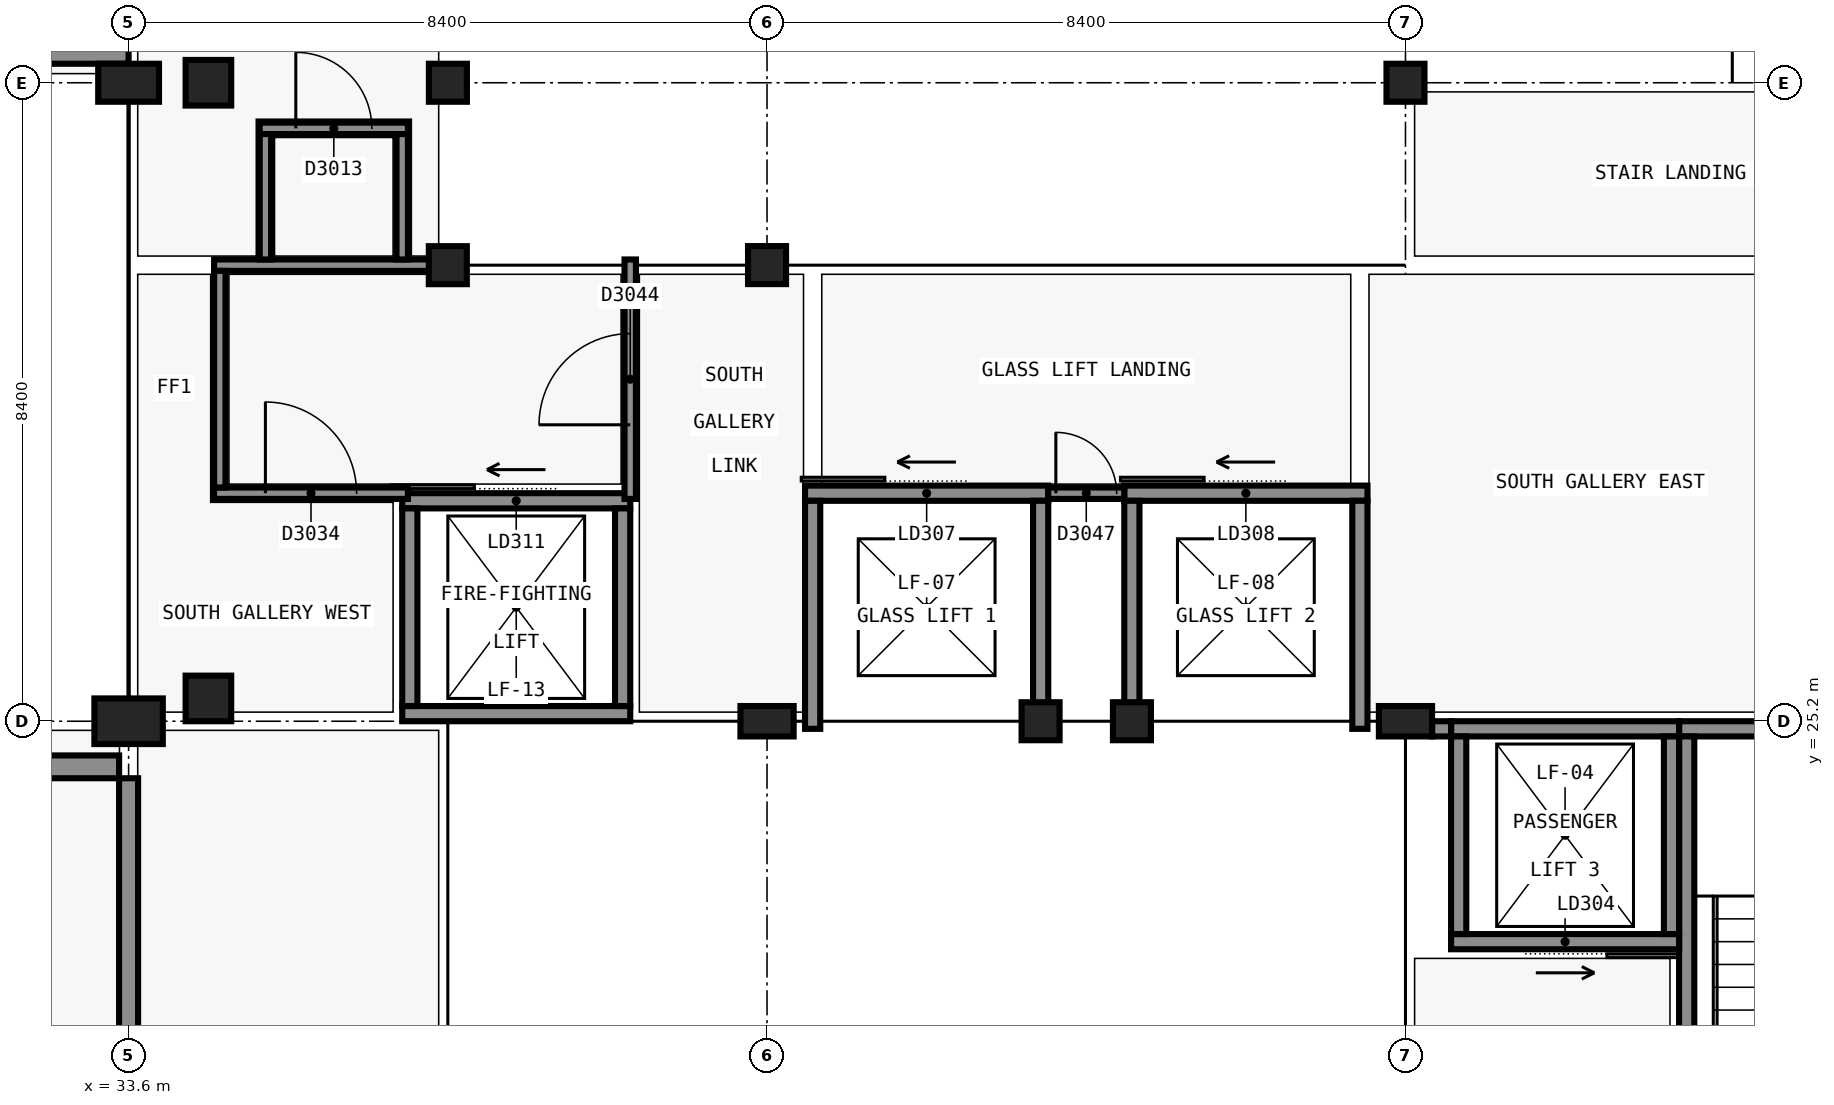
"""IFC4 building model, lengths in metres.
Left out: names, types, materials, properties, quantities, classifications, styles, units other than length and angle.
Written with IfcOpenShell. Run it as: python <this file> out.ifc"""

import sys

from ifc_helpers import new_model, si_unit, direction, frame, frame_2d, origin, origin_2d, place, context, subcontext, project, spatial, rectangle, extrude, element, fill, save


model = new_model("IFC4")
c1 = context("Model", 3, precision=1e-05, world=origin(), true_north=direction((0.0, 1.0)))
c2 = subcontext(c1, "Body", "Model", "MODEL_VIEW")
j1 = project(units=[si_unit("LENGTHUNIT", "METRE"), si_unit("PLANEANGLEUNIT", "RADIAN")], contexts=[c1])
p1 = place(None, origin())
s1 = spatial("IfcSite", under=j1, at=p1, CompositionType="ELEMENT")
p2 = place(p1, origin())
s2 = spatial("IfcBuilding", under=s1, at=p2, CompositionType="ELEMENT")
p3 = place(p2, frame((0.0, 0.0, 15.0)))
s3 = spatial("IfcBuildingStorey", under=s2, at=p3, CompositionType="ELEMENT", Elevation=15.0)
p4 = place(p3, frame((54.0, 25.1, 0.0), z_axis=(0.0, 0.0, 1.0), x_axis=(1.0, 0.0, 0.0)))
e1 = element("IfcWall", 1, at=p4, inside=s3, PredefinedType="SHEAR", context=c2, shape_type="SweptSolid", body=[
    extrude(rectangle(XDim=4.8, YDim=0.2, at=frame_2d((2.4, 0.0))), origin(), (0.0, 0.0, 1.0), 4.8),
])
p5 = place(p3, frame((54.1, 15.8, 0.0), z_axis=(0.0, 0.0, 1.0), x_axis=(0.0, 1.0, 0.0)))
e2 = element("IfcWall", 2, at=p5, inside=s3, PredefinedType="SHEAR", context=c2, shape_type="SweptSolid", body=[
    extrude(rectangle(XDim=9.2, YDim=0.2, at=frame_2d((4.6, 0.0))), origin(), (0.0, 0.0, 1.0), 4.8),
])
p6 = place(p5, frame((0.5, 0.0, 0.0)))
e3 = element("IfcOpeningElement", 3, at=p6, cuts=e2, PredefinedType="OPENING", context=c2, shape_type="SweptSolid", body=[
    extrude(rectangle(XDim=1.2, YDim=2.1, at=frame_2d((0.6, 1.05))), frame((0.0, 0.11, 0.0), z_axis=(0.0, -1.0, 0.0), x_axis=(1.0, 0.0, 0.0)), (0.0, 0.0, 1.0), 0.22),
])
p7 = place(p3, frame((54.0, 22.3, 0.0), z_axis=(0.0, 0.0, 1.0), x_axis=(-1.0, 0.0, 0.0)))
e4 = element("IfcWall", 4, at=p7, inside=s3, PredefinedType="SHEAR", context=c2, shape_type="SweptSolid", body=[
    extrude(rectangle(XDim=3.0, YDim=0.2, at=frame_2d((1.5, 0.0))), origin(), (0.0, 0.0, 1.0), 4.8),
])
p8 = place(p7, frame((0.95, 0.0, 0.0)))
e5 = element("IfcOpeningElement", 5, at=p8, cuts=e4, PredefinedType="OPENING", context=c2, shape_type="SweptSolid", body=[
    extrude(rectangle(XDim=1.1, YDim=2.1, at=frame_2d((0.55, 1.05))), frame((0.0, 0.11, 0.0), z_axis=(0.0, -1.0, 0.0), x_axis=(1.0, 0.0, 0.0)), (0.0, 0.0, 1.0), 0.22),
])
p9 = place(p3, frame((51.0, 25.1, 0.0), z_axis=(0.0, 0.0, 1.0), x_axis=(1.0, 0.0, 0.0)))
e6 = element("IfcWall", 6, at=p9, inside=s3, PredefinedType="SHEAR", context=c2, shape_type="SweptSolid", body=[
    extrude(rectangle(XDim=3.0, YDim=0.2, at=frame_2d((1.5, 0.0))), origin(), (0.0, 0.0, 1.0), 4.8),
])
for number, where, z_axis, x_axis in (
    (7, (51.1, 22.4, 0.0), (0.0, 0.0, 1.0), (0.0, 1.0, 0.0)),
    (8, (53.9, 25.0, 0.0), (0.0, 0.0, 1.0), (0.0, -1.0, 0.0)),
):
    element("IfcWall", number, at=place(p3, frame(where, z_axis=z_axis, x_axis=x_axis)), inside=s3, PredefinedType="SHEAR", context=c2, shape_type="SweptSolid", body=[
        extrude(rectangle(XDim=2.6, YDim=0.2, at=frame_2d((1.3, 0.0))), origin(), (0.0, 0.0, 1.0), 4.8),
    ])
p10 = place(p3, frame((40.2, 25.3, 0.0), z_axis=(0.0, 0.0, 1.0), x_axis=(-1.0, 0.0, 0.0)))
e9 = element("IfcWall", 9, at=p10, inside=s3, PredefinedType="SHEAR", context=c2, shape_type="SweptSolid", body=[
    extrude(rectangle(XDim=3.0, YDim=0.2, at=frame_2d((1.5, 0.0))), origin(), (0.0, 0.0, 1.0), 4.8),
])
p11 = place(p3, frame((37.2, 28.1, 0.0), z_axis=(0.0, 0.0, 1.0), x_axis=(1.0, 0.0, 0.0)))
e10 = element("IfcWall", 10, at=p11, inside=s3, PredefinedType="SHEAR", context=c2, shape_type="SweptSolid", body=[
    extrude(rectangle(XDim=3.0, YDim=0.2, at=frame_2d((1.5, 0.0))), origin(), (0.0, 0.0, 1.0), 4.8),
])
p12 = place(p11, frame((0.95, 0.0, 0.0)))
e11 = element("IfcOpeningElement", 11, at=p12, cuts=e10, PredefinedType="OPENING", context=c2, shape_type="SweptSolid", body=[
    extrude(rectangle(XDim=1.1, YDim=2.1, at=frame_2d((0.55, 1.05))), frame((0.0, 0.11, 0.0), z_axis=(0.0, -1.0, 0.0), x_axis=(1.0, 0.0, 0.0)), (0.0, 0.0, 1.0), 0.22),
])
for number, where, z_axis, x_axis in (
    (12, (37.3, 25.4, 0.0), (0.0, 0.0, 1.0), (0.0, 1.0, 0.0)),
    (13, (40.1, 28.0, 0.0), (0.0, 0.0, 1.0), (0.0, -1.0, 0.0)),
):
    element("IfcWall", number, at=place(p3, frame(where, z_axis=z_axis, x_axis=x_axis)), inside=s3, PredefinedType="SHEAR", context=c2, shape_type="SweptSolid", body=[
        extrude(rectangle(XDim=2.6, YDim=0.2, at=frame_2d((1.3, 0.0))), origin(), (0.0, 0.0, 1.0), 4.8),
    ])
p13 = place(p3, frame((33.6, 25.2, 0.0), z_axis=(0.0, 0.0, 1.0), x_axis=(1.0, 0.0, 0.0)))
e14 = element("IfcColumn", 14, at=p13, inside=s3, PredefinedType="COLUMN", context=c2, shape_type="SweptSolid", body=[
    extrude(rectangle(XDim=0.9, YDim=0.6, at=origin_2d()), origin(), (0.0, 0.0, 1.0), 4.8),
])
p14 = place(p3, frame((50.4, 25.2, 0.0), z_axis=(0.0, 0.0, 1.0), x_axis=(1.0, 0.0, 0.0)))
e15 = element("IfcColumn", 15, at=p14, inside=s3, PredefinedType="COLUMN", context=c2, shape_type="SweptSolid", body=[
    extrude(rectangle(XDim=0.7, YDim=0.4, at=origin_2d()), origin(), (0.0, 0.0, 1.0), 4.8),
])
p15 = place(p3, frame((33.6, 33.6, 0.0), z_axis=(0.0, 0.0, 1.0), x_axis=(1.0, 0.0, 0.0)))
e16 = element("IfcColumn", 16, at=p15, inside=s3, PredefinedType="COLUMN", context=c2, shape_type="SweptSolid", body=[
    extrude(rectangle(XDim=0.8, YDim=0.5, at=origin_2d()), origin(), (0.0, 0.0, 1.0), 4.8),
])
p16 = place(p3, frame((42.0, 25.2, 0.0), z_axis=(0.0, 0.0, 1.0), x_axis=(1.0, 0.0, 0.0)))
e17 = element("IfcColumn", 17, at=p16, inside=s3, PredefinedType="COLUMN", context=c2, shape_type="SweptSolid", body=[
    extrude(rectangle(XDim=0.7, YDim=0.4, at=origin_2d()), origin(), (0.0, 0.0, 1.0), 4.8),
])
p17 = place(p3, frame((50.4, 33.6, 0.0), z_axis=(0.0, 0.0, 1.0), x_axis=(1.0, 0.0, 0.0)))
e18 = element("IfcColumn", 18, at=p17, inside=s3, PredefinedType="COLUMN", context=c2, shape_type="SweptSolid", body=[
    extrude(rectangle(XDim=0.5, YDim=0.5, at=origin_2d()), origin(), (0.0, 0.0, 1.0), 4.8),
])
for number, where, z_axis, x_axis in (
    (19, (34.65, 25.5, 0.0), (0.0, 0.0, 1.0), (1.0, 0.0, 0.0)),
    (20, (34.65, 33.6, 0.0), (0.0, 0.0, 1.0), (1.0, 0.0, 0.0)),
):
    element("IfcColumn", number, at=place(p3, frame(where, z_axis=z_axis, x_axis=x_axis)), inside=s3, PredefinedType="COLUMN", context=c2, shape_type="SweptSolid", body=[
        extrude(rectangle(XDim=0.6, YDim=0.6, at=origin_2d()), origin(), (0.0, 0.0, 1.0), 4.8),
    ])
p18 = place(p3, frame((50.75, 25.1, 0.0), z_axis=(0.0, 0.0, 1.0), x_axis=(1.0, 0.0, 0.0)))
e21 = element("IfcWall", 21, at=p18, inside=s3, PredefinedType="SHEAR", context=c2, shape_type="SweptSolid", body=[
    extrude(rectangle(XDim=0.25, YDim=0.2, at=frame_2d((0.125, 0.0))), origin(), (0.0, 0.0, 1.0), 4.8),
])
for number, where, z_axis, x_axis in (
    (22, (45.599, 25.2, 0.0), (0.0, 0.0, 1.0), (1.0, 0.0, 0.0)),
    (23, (46.801, 25.2, 0.0), (0.0, 0.0, 1.0), (1.0, 0.0, 0.0)),
    (24, (37.8, 31.2, 0.0), (0.0, 0.0, 1.0), (1.0, 0.0, 0.0)),
    (25, (37.801, 33.6, 0.0), (0.0, 0.0, 1.0), (1.0, 0.0, 0.0)),
    (26, (42.0, 31.201, 0.0), (0.0, 0.0, 1.0), (1.0, 0.0, 0.0)),
):
    element("IfcColumn", number, at=place(p3, frame(where, z_axis=z_axis, x_axis=x_axis)), inside=s3, PredefinedType="COLUMN", context=c2, shape_type="SweptSolid", body=[
        extrude(rectangle(XDim=0.5, YDim=0.5, at=origin_2d()), origin(), (0.0, 0.0, 1.0), 4.8),
    ])
p19 = place(p3, frame((29.051, 24.6, 0.0), z_axis=(0.0, 0.0, 1.0), x_axis=(1.0, 0.0, 0.0)))
e27 = element("IfcWall", 27, at=p19, inside=s3, PredefinedType="SOLIDWALL", context=c2, shape_type="SweptSolid", body=[
    extrude(rectangle(XDim=4.425, YDim=0.3, at=frame_2d((2.212, 0.0))), origin(), (0.0, 0.0, 1.0), 4.5),
])
p20 = place(p19, frame((0.775, 0.0, 0.9)))
e28 = element("IfcOpeningElement", 28, at=p20, cuts=e27, PredefinedType="OPENING", context=c2, shape_type="SweptSolid", body=[
    extrude(rectangle(XDim=2.4, YDim=1.5, at=frame_2d((1.2, 0.75))), frame((0.0, 0.16, 0.0), z_axis=(0.0, -1.0, 0.0), x_axis=(1.0, 0.0, 0.0)), (0.0, 0.0, 1.0), 0.32),
])
p21 = place(p3, frame((33.6, 34.0, 0.0), z_axis=(0.0, 0.0, 1.0), x_axis=(-1.0, 0.0, 0.0)))
e29 = element("IfcWall", 29, at=p21, inside=s3, PredefinedType="SOLIDWALL", context=c2, shape_type="SweptSolid", body=[
    extrude(rectangle(XDim=4.557, YDim=0.3, at=frame_2d((2.278, 0.0))), origin(), (0.0, 0.0, 1.0), 4.5),
])
p22 = place(p3, frame((33.6, 8.6, 0.0), z_axis=(0.0, 0.0, 1.0), x_axis=(0.0, 1.0, 0.0)))
e30 = element("IfcWall", 30, at=p22, inside=s3, PredefinedType="SOLIDWALL", context=c2, shape_type="SweptSolid", body=[
    extrude(rectangle(XDim=15.85, YDim=0.25, at=frame_2d((7.925, 0.0))), origin(), (0.0, 0.0, 1.0), 3.8),
])
p23 = place(p3, frame((42.5, 28.2, 0.0), z_axis=(0.0, 0.0, 1.0), x_axis=(1.0, 0.0, 0.0)))
e31 = element("IfcWall", 31, at=p23, inside=s3, PredefinedType="SHEAR", context=c2, shape_type="SweptSolid", body=[
    extrude(rectangle(XDim=3.2, YDim=0.2, at=frame_2d((1.6, 0.0))), origin(), (0.0, 0.0, 1.0), 4.5),
])
p24 = place(p23, frame((1.05, 0.0, 0.0)))
e32 = element("IfcOpeningElement", 32, at=p24, cuts=e31, PredefinedType="OPENING", context=c2, shape_type="SweptSolid", body=[
    extrude(rectangle(XDim=1.1, YDim=2.1, at=frame_2d((0.55, 1.05))), frame((0.0, 0.11, 0.0), z_axis=(0.0, -1.0, 0.0), x_axis=(1.0, 0.0, 0.0)), (0.0, 0.0, 1.0), 0.22),
])
p25 = place(p3, frame((46.7, 28.2, 0.0), z_axis=(0.0, 0.0, 1.0), x_axis=(1.0, 0.0, 0.0)))
e33 = element("IfcWall", 33, at=p25, inside=s3, PredefinedType="SHEAR", context=c2, shape_type="SweptSolid", body=[
    extrude(rectangle(XDim=3.2, YDim=0.2, at=frame_2d((1.6, 0.0))), origin(), (0.0, 0.0, 1.0), 4.5),
])
p26 = place(p25, frame((1.05, 0.0, 0.0)))
e34 = element("IfcOpeningElement", 34, at=p26, cuts=e33, PredefinedType="OPENING", context=c2, shape_type="SweptSolid", body=[
    extrude(rectangle(XDim=1.1, YDim=2.1, at=frame_2d((0.55, 1.05))), frame((0.0, 0.11, 0.0), z_axis=(0.0, -1.0, 0.0), x_axis=(1.0, 0.0, 0.0)), (0.0, 0.0, 1.0), 0.22),
])
for number, where, z_axis, x_axis in (
    (35, (42.6, 25.1, 0.0), (0.0, 0.0, 1.0), (0.0, 1.0, 0.0)),
    (36, (45.6, 25.1, 0.0), (0.0, 0.0, 1.0), (0.0, 1.0, 0.0)),
    (37, (46.8, 25.1, 0.0), (0.0, 0.0, 1.0), (0.0, 1.0, 0.0)),
    (38, (49.8, 25.1, 0.0), (0.0, 0.0, 1.0), (0.0, 1.0, 0.0)),
):
    element("IfcWall", number, at=place(p3, frame(where, z_axis=z_axis, x_axis=x_axis)), inside=s3, PredefinedType="SHEAR", context=c2, shape_type="SweptSolid", body=[
        extrude(rectangle(XDim=3.0, YDim=0.2, at=frame_2d((1.5, 0.0))), origin(), (0.0, 0.0, 1.0), 4.5),
    ])
p27 = place(p3, frame((35.325, 33.0, 0.0), z_axis=(0.0, 0.0, 1.0), x_axis=(1.0, 0.0, 0.0)))
e39 = element("IfcWall", 39, at=p27, inside=s3, PredefinedType="PARTITIONING", context=c2, shape_type="SweptSolid", body=[
    extrude(rectangle(XDim=1.95, YDim=0.15, at=frame_2d((0.975, 0.0))), origin(), (0.0, 0.0, 1.0), 4.5),
])
p28 = place(p27, frame((0.475, 0.0, 0.0)))
e40 = element("IfcOpeningElement", 40, at=p28, cuts=e39, PredefinedType="OPENING", context=c2, shape_type="SweptSolid", body=[
    extrude(rectangle(XDim=1.0, YDim=2.1, at=frame_2d((0.5, 1.05))), frame((0.0, 0.085, 0.0), z_axis=(0.0, -1.0, 0.0), x_axis=(1.0, 0.0, 0.0)), (0.0, 0.0, 1.0), 0.17),
])
p29 = place(p3, frame((34.725, 28.2, 0.0), z_axis=(0.0, 0.0, 1.0), x_axis=(1.0, 0.0, 0.0)))
e41 = element("IfcWall", 41, at=p29, inside=s3, PredefinedType="SOLIDWALL", context=c2, shape_type="SweptSolid", body=[
    extrude(rectangle(XDim=2.55, YDim=0.15, at=frame_2d((1.275, 0.0))), origin(), (0.0, 0.0, 1.0), 4.5),
])
p30 = place(p29, frame((0.675, 0.0, 0.0)))
e42 = element("IfcOpeningElement", 42, at=p30, cuts=e41, PredefinedType="OPENING", context=c2, shape_type="SweptSolid", body=[
    extrude(rectangle(XDim=1.2, YDim=2.1, at=frame_2d((0.6, 1.05))), frame((0.0, 0.085, 0.0), z_axis=(0.0, -1.0, 0.0), x_axis=(1.0, 0.0, 0.0)), (0.0, 0.0, 1.0), 0.17),
])
p31 = place(p3, frame((34.725, 31.2, 0.0), z_axis=(0.0, 0.0, 1.0), x_axis=(1.0, 0.0, 0.0)))
e43 = element("IfcWall", 43, at=p31, inside=s3, PredefinedType="SOLIDWALL", context=c2, shape_type="SweptSolid", body=[
    extrude(rectangle(XDim=3.15, YDim=0.15, at=frame_2d((1.575, 0.0))), origin(), (0.0, 0.0, 1.0), 4.0),
])
p32 = place(p3, frame((45.7, 28.2, 0.0), z_axis=(0.0, 0.0, 1.0), x_axis=(1.0, 0.0, 0.0)))
e44 = element("IfcWall", 44, at=p32, inside=s3, PredefinedType="SOLIDWALL", context=c2, shape_type="SweptSolid", body=[
    extrude(rectangle(XDim=1.0, YDim=0.15, at=frame_2d((0.5, 0.0))), origin(), (0.0, 0.0, 1.0), 4.5),
])
p33 = place(p32, frame((0.1, 0.0, 0.0)))
e45 = element("IfcOpeningElement", 45, at=p33, cuts=e44, PredefinedType="OPENING", context=c2, shape_type="SweptSolid", body=[
    extrude(rectangle(XDim=0.8, YDim=2.1, at=frame_2d((0.4, 1.05))), frame((0.0, 0.085, 0.0), z_axis=(0.0, -1.0, 0.0), x_axis=(1.0, 0.0, 0.0)), (0.0, 0.0, 1.0), 0.17),
])
for number, where, z_axis, x_axis in (
    (46, (35.4, 31.275, 0.0), (0.0, 0.0, 1.0), (0.0, 1.0, 0.0)),
    (47, (37.2, 31.275, 0.0), (0.0, 0.0, 1.0), (0.0, 1.0, 0.0)),
):
    element("IfcWall", number, at=place(p3, frame(where, z_axis=z_axis, x_axis=x_axis)), inside=s3, PredefinedType="PARTITIONING", context=c2, shape_type="SweptSolid", body=[
        extrude(rectangle(XDim=1.65, YDim=0.15, at=frame_2d((0.825, 0.0))), origin(), (0.0, 0.0, 1.0), 4.5),
    ])
p34 = place(p3, frame((34.8, 28.275, 0.0), z_axis=(0.0, 0.0, 1.0), x_axis=(0.0, 1.0, 0.0)))
e48 = element("IfcWall", 48, at=p34, inside=s3, PredefinedType="SOLIDWALL", context=c2, shape_type="SweptSolid", body=[
    extrude(rectangle(XDim=2.85, YDim=0.15, at=frame_2d((1.425, 0.0))), origin(), (0.0, 0.0, 1.0), 4.5),
])
p35 = place(p3, frame((40.2, 28.125, 0.0), z_axis=(0.0, 0.0, 1.0), x_axis=(0.0, 1.0, 0.0)))
e49 = element("IfcWall", 49, at=p35, inside=s3, PredefinedType="SOLIDWALL", context=c2, shape_type="SweptSolid", body=[
    extrude(rectangle(XDim=3.15, YDim=0.15, at=frame_2d((1.575, 0.0))), origin(), (0.0, 0.0, 1.0), 4.0),
])
p36 = place(p35, frame((0.975, 0.0, 0.0)))
e50 = element("IfcOpeningElement", 50, at=p36, cuts=e49, PredefinedType="OPENING", context=c2, shape_type="SweptSolid", body=[
    extrude(rectangle(XDim=1.2, YDim=2.1, at=frame_2d((0.6, 1.05))), frame((0.0, 0.085, 0.0), z_axis=(0.0, -1.0, 0.0), x_axis=(1.0, 0.0, 0.0)), (0.0, 0.0, 1.0), 0.17),
])
p37 = place(p8, origin())
e51 = element("IfcDoor", 51, at=p37, inside=s3, OperationType="SLIDING_TO_LEFT", PredefinedType="DOOR", context=c2, shape_type="SweptSolid", body=[
    extrude(rectangle(XDim=1.1, YDim=2.1, at=frame_2d((0.55, 1.05))), frame((0.0, 0.025, 0.0), z_axis=(0.0, -1.0, 0.0), x_axis=(1.0, 0.0, 0.0)), (0.0, 0.0, 1.0), 0.05),
])
fill(e5, e51)
p38 = place(p24, origin())
e52 = element("IfcDoor", 52, at=p38, inside=s3, OperationType="SLIDING_TO_LEFT", PredefinedType="DOOR", context=c2, shape_type="SweptSolid", body=[
    extrude(rectangle(XDim=1.1, YDim=2.1, at=frame_2d((0.55, 1.05))), frame((0.0, 0.025, 0.0), z_axis=(0.0, -1.0, 0.0), x_axis=(1.0, 0.0, 0.0)), (0.0, 0.0, 1.0), 0.05),
])
fill(e32, e52)
p39 = place(p26, origin())
e53 = element("IfcDoor", 53, at=p39, inside=s3, OperationType="SLIDING_TO_LEFT", PredefinedType="DOOR", context=c2, shape_type="SweptSolid", body=[
    extrude(rectangle(XDim=1.1, YDim=2.1, at=frame_2d((0.55, 1.05))), frame((0.0, 0.025, 0.0), z_axis=(0.0, -1.0, 0.0), x_axis=(1.0, 0.0, 0.0)), (0.0, 0.0, 1.0), 0.05),
])
fill(e34, e53)
p40 = place(p12, origin())
e54 = element("IfcDoor", 54, at=p40, inside=s3, OperationType="SLIDING_TO_LEFT", PredefinedType="DOOR", context=c2, shape_type="SweptSolid", body=[
    extrude(rectangle(XDim=1.1, YDim=2.1, at=frame_2d((0.55, 1.05))), frame((0.0, 0.025, 0.0), z_axis=(0.0, -1.0, 0.0), x_axis=(1.0, 0.0, 0.0)), (0.0, 0.0, 1.0), 0.05),
])
fill(e11, e54)
p41 = place(p28, origin())
e55 = element("IfcDoor", 55, at=p41, inside=s3, OperationType="SINGLE_SWING_LEFT", PredefinedType="DOOR", context=c2, shape_type="SweptSolid", body=[
    extrude(rectangle(XDim=1.0, YDim=2.1, at=frame_2d((0.5, 1.05))), frame((0.0, 0.025, 0.0), z_axis=(0.0, -1.0, 0.0), x_axis=(1.0, 0.0, 0.0)), (0.0, 0.0, 1.0), 0.05),
])
fill(e40, e55)
p42 = place(p30, origin())
e56 = element("IfcDoor", 56, at=p42, inside=s3, OperationType="SINGLE_SWING_RIGHT", PredefinedType="DOOR", context=c2, shape_type="SweptSolid", body=[
    extrude(rectangle(XDim=1.2, YDim=2.1, at=frame_2d((0.6, 1.05))), frame((0.0, 0.025, 0.0), z_axis=(0.0, -1.0, 0.0), x_axis=(1.0, 0.0, 0.0)), (0.0, 0.0, 1.0), 0.05),
])
fill(e42, e56)
p43 = place(p36, origin())
e57 = element("IfcDoor", 57, at=p43, inside=s3, OperationType="SINGLE_SWING_RIGHT", PredefinedType="DOOR", context=c2, shape_type="SweptSolid", body=[
    extrude(rectangle(XDim=1.2, YDim=2.1, at=frame_2d((0.6, 1.05))), frame((0.0, 0.025, 0.0), z_axis=(0.0, -1.0, 0.0), x_axis=(1.0, 0.0, 0.0)), (0.0, 0.0, 1.0), 0.05),
])
fill(e50, e57)
p44 = place(p33, origin())
e58 = element("IfcDoor", 58, at=p44, inside=s3, OperationType="SINGLE_SWING_RIGHT", PredefinedType="DOOR", context=c2, shape_type="SweptSolid", body=[
    extrude(rectangle(XDim=0.8, YDim=2.1, at=frame_2d((0.4, 1.05))), frame((0.0, 0.025, 0.0), z_axis=(0.0, -1.0, 0.0), x_axis=(1.0, 0.0, 0.0)), (0.0, 0.0, 1.0), 0.05),
])
fill(e45, e58)
save(model, sys.argv[1])
